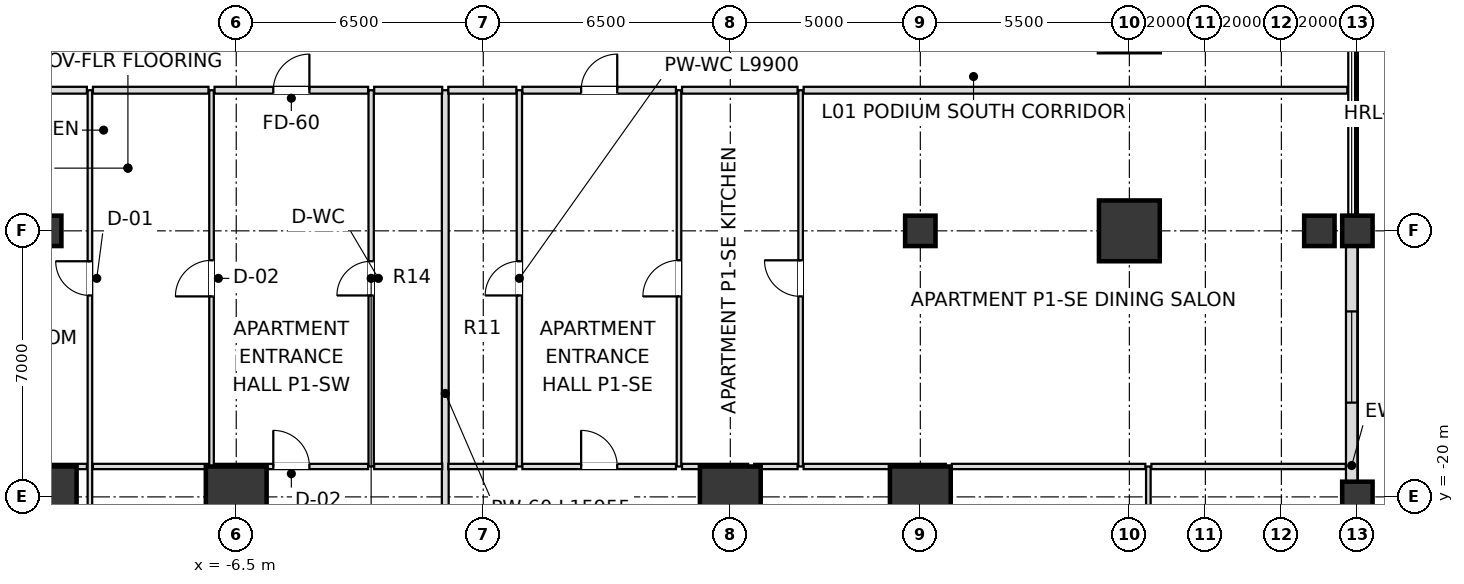
"""IFC4 building model, lengths in metres.
Left out: names, types, materials, properties, quantities, classifications, styles, units other than length and angle.
Written with IfcOpenShell. Run it as: python <this file> out.ifc"""

import sys

from ifc_helpers import new_model, si_unit, direction, frame, frame_2d, origin, origin_2d, place, context, subcontext, project, spatial, rectangle, extrude, element, fill, save


model = new_model("IFC4")
c1 = context("Model", 3, precision=1e-05, world=origin(), true_north=direction((0.0, 1.0)))
c2 = subcontext(c1, "Body", "Model", "MODEL_VIEW")
j1 = project(units=[si_unit("LENGTHUNIT", "METRE"), si_unit("PLANEANGLEUNIT", "RADIAN")], contexts=[c1])
p1 = place(None, origin())
s1 = spatial("IfcSite", under=j1, at=p1, CompositionType="ELEMENT")
p2 = place(p1, origin())
s2 = spatial("IfcBuilding", under=s1, at=p2, CompositionType="ELEMENT")
p3 = place(p2, frame((0.0, 0.0, 6.0)))
s3 = spatial("IfcBuildingStorey", under=s2, at=p3, CompositionType="ELEMENT", Elevation=6.0)
for number, where, z_axis, x_axis in (
    (1, (-11.5, -20.0, 0.0), (0.0, 0.0, 1.0), (1.0, 0.0, 0.0)),
    (2, (-6.5, -20.0, 0.0), (0.0, 0.0, 1.0), (1.0, 0.0, 0.0)),
    (3, (6.5, -20.0, 0.0), (0.0, 0.0, 1.0), (1.0, 0.0, 0.0)),
    (4, (11.5, -20.0, 0.0), (0.0, 0.0, 1.0), (1.0, 0.0, 0.0)),
    (5, (17.0, -13.0, 0.0), (0.0, 0.0, 1.0), (1.0, 0.0, 0.0)),
):
    element("IfcColumn", number, at=place(p3, frame(where, z_axis=z_axis, x_axis=x_axis)), inside=s3, PredefinedType="USERDEFINED", context=c2, shape_type="SweptSolid", body=[
        extrude(rectangle(XDim=1.6, YDim=1.6, at=origin_2d()), origin(), (0.0, 0.0, 1.0), 5.4),
    ])
for number, where, z_axis, x_axis in (
    (6, (23.0, -20.0, 0.0), (0.0, 0.0, 1.0), (1.0, 0.0, 0.0)),
    (7, (23.0, -13.0, 0.0), (0.0, 0.0, 1.0), (1.0, 0.0, 0.0)),
    (8, (-11.5, -13.0, 0.0), (0.0, 0.0, 1.0), (1.0, 0.0, 0.0)),
    (9, (11.5, -13.0, 0.0), (0.0, 0.0, 1.0), (1.0, 0.0, 0.0)),
    (10, (22.0, -13.0, 0.0), (0.0, 0.0, 1.0), (1.0, 0.0, 0.0)),
):
    element("IfcColumn", number, at=place(p3, frame(where, z_axis=z_axis, x_axis=x_axis)), inside=s3, PredefinedType="COLUMN", context=c2, shape_type="SweptSolid", body=[
        extrude(rectangle(XDim=0.8, YDim=0.8, at=origin_2d()), origin(), (0.0, 0.0, 1.0), 5.4),
    ])
p4 = place(p3, frame((22.85, -13.0, 0.0), z_axis=(0.0, 0.0, 1.0), x_axis=(0.0, -1.0, 0.0)))
e11 = element("IfcWall", 11, at=p4, inside=s3, PredefinedType="SOLIDWALL", context=c2, shape_type="SweptSolid", body=[
    extrude(rectangle(XDim=12.35, YDim=0.3, at=frame_2d((6.175, 0.0))), origin(), (0.0, 0.0, 1.0), 4.476),
])
p5 = place(p4, frame((2.12, 0.0, 0.8)))
e12 = element("IfcOpeningElement", 12, at=p5, cuts=e11, PredefinedType="OPENING", context=c2, shape_type="SweptSolid", body=[
    extrude(rectangle(XDim=2.4, YDim=2.2, at=frame_2d((1.2, 1.1))), frame((0.0, 0.16, 0.0), z_axis=(0.0, -1.0, 0.0), x_axis=(1.0, 0.0, 0.0)), (0.0, 0.0, 1.0), 0.32),
])
p6 = place(p4, frame((8.62, 0.0, 0.8)))
e13 = element("IfcOpeningElement", 13, at=p6, cuts=e11, PredefinedType="OPENING", context=c2, shape_type="SweptSolid", body=[
    extrude(rectangle(XDim=2.4, YDim=2.2, at=frame_2d((1.2, 1.1))), frame((0.0, 0.16, 0.0), z_axis=(0.0, -1.0, 0.0), x_axis=(1.0, 0.0, 0.0)), (0.0, 0.0, 1.0), 0.32),
])
p7 = place(p3, frame((-10.35, -25.195, 0.0), z_axis=(0.0, 0.0, 1.0), x_axis=(0.0, 1.0, 0.0)))
e14 = element("IfcWall", 14, at=p7, inside=s3, PredefinedType="PARTITIONING", context=c2, shape_type="SweptSolid", body=[
    extrude(rectangle(XDim=15.895, YDim=0.12, at=frame_2d((7.948, 0.0))), origin(), (0.0, 0.0, 1.0), 4.41),
])
p8 = place(p7, frame((10.495, 0.0, 0.0)))
e15 = element("IfcOpeningElement", 15, at=p8, cuts=e14, PredefinedType="OPENING", context=c2, shape_type="SweptSolid", body=[
    extrude(rectangle(XDim=0.9, YDim=2.1, at=frame_2d((0.45, 1.05))), frame((0.0, 0.07, 0.0), z_axis=(0.0, -1.0, 0.0), x_axis=(1.0, 0.0, 0.0)), (0.0, 0.0, 1.0), 0.14),
])
p9 = place(p7, frame((2.545, 0.0, 0.0)))
e16 = element("IfcOpeningElement", 16, at=p9, cuts=e14, PredefinedType="OPENING", context=c2, shape_type="SweptSolid", body=[
    extrude(rectangle(XDim=0.9, YDim=2.1, at=frame_2d((0.45, 1.05))), frame((0.0, 0.07, 0.0), z_axis=(0.0, -1.0, 0.0), x_axis=(1.0, 0.0, 0.0)), (0.0, 0.0, 1.0), 0.14),
])
p10 = place(p3, frame((-7.15, -19.2, 0.0), z_axis=(0.0, 0.0, 1.0), x_axis=(0.0, 1.0, 0.0)))
e17 = element("IfcWall", 17, at=p10, inside=s3, PredefinedType="PARTITIONING", context=c2, shape_type="SweptSolid", body=[
    extrude(rectangle(XDim=9.9, YDim=0.12, at=frame_2d((4.95, 0.0))), origin(), (0.0, 0.0, 1.0), 4.41),
])
p11 = place(p10, frame((4.475, 0.0, 0.0)))
e18 = element("IfcOpeningElement", 18, at=p11, cuts=e17, PredefinedType="OPENING", context=c2, shape_type="SweptSolid", body=[
    extrude(rectangle(XDim=0.95, YDim=2.1, at=frame_2d((0.475, 1.05))), frame((0.0, 0.07, 0.0), z_axis=(0.0, -1.0, 0.0), x_axis=(1.0, 0.0, 0.0)), (0.0, 0.0, 1.0), 0.14),
])
p12 = place(p3, frame((-2.95, -19.2, 0.0), z_axis=(0.0, 0.0, 1.0), x_axis=(0.0, 1.0, 0.0)))
e19 = element("IfcWall", 19, at=p12, inside=s3, PredefinedType="PARTITIONING", context=c2, shape_type="SweptSolid", body=[
    extrude(rectangle(XDim=9.9, YDim=0.14, at=frame_2d((4.95, 0.0))), origin(), (0.0, 0.0, 1.0), 4.642),
])
p13 = place(p12, frame((4.5, 0.0, 0.0)))
e20 = element("IfcOpeningElement", 20, at=p13, cuts=e19, PredefinedType="OPENING", context=c2, shape_type="SweptSolid", body=[
    extrude(rectangle(XDim=0.9, YDim=2.1, at=frame_2d((0.45, 1.05))), frame((0.0, 0.08, 0.0), z_axis=(0.0, -1.0, 0.0), x_axis=(1.0, 0.0, 0.0)), (0.0, 0.0, 1.0), 0.16),
])
p14 = place(p3, frame((-1.0, -25.255, 0.0), z_axis=(0.0, 0.0, 1.0), x_axis=(0.0, 1.0, 0.0)))
e21 = element("IfcWall", 21, at=p14, inside=s3, PredefinedType="PARTITIONING", context=c2, shape_type="SweptSolid", body=[
    extrude(rectangle(XDim=15.955, YDim=0.18, at=frame_2d((7.978, 0.0))), origin(), (0.0, 0.0, 1.0), 4.476),
])
p15 = place(p3, frame((0.95, -19.2, 0.0), z_axis=(0.0, 0.0, 1.0), x_axis=(0.0, 1.0, 0.0)))
e22 = element("IfcWall", 22, at=p15, inside=s3, PredefinedType="PARTITIONING", context=c2, shape_type="SweptSolid", body=[
    extrude(rectangle(XDim=9.9, YDim=0.14, at=frame_2d((4.95, 0.0))), origin(), (0.0, 0.0, 1.0), 4.642),
])
p16 = place(p15, frame((4.5, 0.0, 0.0)))
e23 = element("IfcOpeningElement", 23, at=p16, cuts=e22, PredefinedType="OPENING", context=c2, shape_type="SweptSolid", body=[
    extrude(rectangle(XDim=0.9, YDim=2.1, at=frame_2d((0.45, 1.05))), frame((0.0, 0.08, 0.0), z_axis=(0.0, -1.0, 0.0), x_axis=(1.0, 0.0, 0.0)), (0.0, 0.0, 1.0), 0.16),
])
p17 = place(p3, frame((5.15, -19.2, 0.0), z_axis=(0.0, 0.0, 1.0), x_axis=(0.0, 1.0, 0.0)))
e24 = element("IfcWall", 24, at=p17, inside=s3, PredefinedType="PARTITIONING", context=c2, shape_type="SweptSolid", body=[
    extrude(rectangle(XDim=9.9, YDim=0.12, at=frame_2d((4.95, 0.0))), origin(), (0.0, 0.0, 1.0), 4.642),
])
p18 = place(p17, frame((4.475, 0.0, 0.0)))
e25 = element("IfcOpeningElement", 25, at=p18, cuts=e24, PredefinedType="OPENING", context=c2, shape_type="SweptSolid", body=[
    extrude(rectangle(XDim=0.95, YDim=2.1, at=frame_2d((0.475, 1.05))), frame((0.0, 0.07, 0.0), z_axis=(0.0, -1.0, 0.0), x_axis=(1.0, 0.0, 0.0)), (0.0, 0.0, 1.0), 0.14),
])
p19 = place(p3, frame((7.05, -25.22, 0.0), z_axis=(0.0, 0.0, 1.0), x_axis=(0.0, 1.0, 0.0)))
e26 = element("IfcWall", 26, at=p19, inside=s3, PredefinedType="PARTITIONING", context=c2, shape_type="SweptSolid", body=[
    extrude(rectangle(XDim=6.02, YDim=0.12, at=frame_2d((3.01, 0.0))), origin(), (0.0, 0.0, 1.0), 4.476),
])
p20 = place(p19, frame((2.57, 0.0, 0.0)))
e27 = element("IfcOpeningElement", 27, at=p20, cuts=e26, PredefinedType="OPENING", context=c2, shape_type="SweptSolid", body=[
    extrude(rectangle(XDim=0.9, YDim=2.1, at=frame_2d((0.45, 1.05))), frame((0.0, 0.07, 0.0), z_axis=(0.0, -1.0, 0.0), x_axis=(1.0, 0.0, 0.0)), (0.0, 0.0, 1.0), 0.14),
])
p21 = place(p3, frame((8.35, -19.2, 0.0), z_axis=(0.0, 0.0, 1.0), x_axis=(0.0, 1.0, 0.0)))
e28 = element("IfcWall", 28, at=p21, inside=s3, PredefinedType="PARTITIONING", context=c2, shape_type="SweptSolid", body=[
    extrude(rectangle(XDim=9.9, YDim=0.12, at=frame_2d((4.95, 0.0))), origin(), (0.0, 0.0, 1.0), 4.41),
])
p22 = place(p21, frame((4.475, 0.0, 0.0)))
e29 = element("IfcOpeningElement", 29, at=p22, cuts=e28, PredefinedType="OPENING", context=c2, shape_type="SweptSolid", body=[
    extrude(rectangle(XDim=0.95, YDim=2.1, at=frame_2d((0.475, 1.05))), frame((0.0, 0.07, 0.0), z_axis=(0.0, -1.0, 0.0), x_axis=(1.0, 0.0, 0.0)), (0.0, 0.0, 1.0), 0.14),
])
p23 = place(p3, frame((12.25, -25.195, 0.0), z_axis=(0.0, 0.0, 1.0), x_axis=(0.0, 1.0, 0.0)))
e30 = element("IfcWall", 30, at=p23, inside=s3, PredefinedType="PARTITIONING", context=c2, shape_type="SweptSolid", body=[
    extrude(rectangle(XDim=5.995, YDim=0.12, at=frame_2d((2.998, 0.0))), origin(), (0.0, 0.0, 1.0), 4.476),
])
p24 = place(p23, frame((2.545, 0.0, 0.0)))
e31 = element("IfcOpeningElement", 31, at=p24, cuts=e30, PredefinedType="OPENING", context=c2, shape_type="SweptSolid", body=[
    extrude(rectangle(XDim=0.9, YDim=2.1, at=frame_2d((0.45, 1.05))), frame((0.0, 0.07, 0.0), z_axis=(0.0, -1.0, 0.0), x_axis=(1.0, 0.0, 0.0)), (0.0, 0.0, 1.0), 0.14),
])
p25 = place(p3, frame((17.5, -25.195, 0.0), z_axis=(0.0, 0.0, 1.0), x_axis=(0.0, 1.0, 0.0)))
e32 = element("IfcWall", 32, at=p25, inside=s3, PredefinedType="PARTITIONING", context=c2, shape_type="SweptSolid", body=[
    extrude(rectangle(XDim=5.995, YDim=0.12, at=frame_2d((2.998, 0.0))), origin(), (0.0, 0.0, 1.0), 4.476),
])
p26 = place(p25, frame((2.545, 0.0, 0.0)))
e33 = element("IfcOpeningElement", 33, at=p26, cuts=e32, PredefinedType="OPENING", context=c2, shape_type="SweptSolid", body=[
    extrude(rectangle(XDim=0.9, YDim=2.1, at=frame_2d((0.45, 1.05))), frame((0.0, 0.07, 0.0), z_axis=(0.0, -1.0, 0.0), x_axis=(1.0, 0.0, 0.0)), (0.0, 0.0, 1.0), 0.14),
])
p27 = place(p3, frame((-14.37, -19.2, 0.0), z_axis=(0.0, 0.0, 1.0), x_axis=(1.0, 0.0, 0.0)))
e34 = element("IfcWall", 34, at=p27, inside=s3, PredefinedType="PARTITIONING", context=c2, shape_type="SweptSolid", body=[
    extrude(rectangle(XDim=3.94, YDim=0.14, at=frame_2d((1.97, 0.0))), origin(), (0.0, 0.0, 1.0), 5.12),
])
p28 = place(p3, frame((-10.27, -19.2, 0.0), z_axis=(0.0, 0.0, 1.0), x_axis=(1.0, 0.0, 0.0)))
e35 = element("IfcWall", 35, at=p28, inside=s3, PredefinedType="PARTITIONING", context=c2, shape_type="SweptSolid", body=[
    extrude(rectangle(XDim=3.04, YDim=0.14, at=frame_2d((1.52, 0.0))), origin(), (0.0, 0.0, 1.0), 5.12),
])
p29 = place(p3, frame((-7.07, -19.2, 0.0), z_axis=(0.0, 0.0, 1.0), x_axis=(1.0, 0.0, 0.0)))
e36 = element("IfcWall", 36, at=p29, inside=s3, PredefinedType="PARTITIONING", context=c2, shape_type="SweptSolid", body=[
    extrude(rectangle(XDim=4.04, YDim=0.14, at=frame_2d((2.02, 0.0))), origin(), (0.0, 0.0, 1.0), 4.41),
])
p30 = place(p29, frame((1.545, 0.0, 0.0)))
e37 = element("IfcOpeningElement", 37, at=p30, cuts=e36, PredefinedType="OPENING", context=c2, shape_type="SweptSolid", body=[
    extrude(rectangle(XDim=0.95, YDim=2.1, at=frame_2d((0.475, 1.05))), frame((0.0, 0.08, 0.0), z_axis=(0.0, -1.0, 0.0), x_axis=(1.0, 0.0, 0.0)), (0.0, 0.0, 1.0), 0.16),
])
for number, where, z_axis, x_axis in (
    (38, (-2.87, -19.2, 0.0), (0.0, 0.0, 1.0), (1.0, 0.0, 0.0)),
    (39, (-0.92, -19.2, 0.0), (0.0, 0.0, 1.0), (1.0, 0.0, 0.0)),
):
    element("IfcWall", number, at=place(p3, frame(where, z_axis=z_axis, x_axis=x_axis)), inside=s3, PredefinedType="PARTITIONING", context=c2, shape_type="SweptSolid", body=[
        extrude(rectangle(XDim=1.79, YDim=0.14, at=frame_2d((0.895, 0.0))), origin(), (0.0, 0.0, 1.0), 5.12),
    ])
p31 = place(p3, frame((1.03, -19.2, 0.0), z_axis=(0.0, 0.0, 1.0), x_axis=(1.0, 0.0, 0.0)))
e40 = element("IfcWall", 40, at=p31, inside=s3, PredefinedType="PARTITIONING", context=c2, shape_type="SweptSolid", body=[
    extrude(rectangle(XDim=4.04, YDim=0.14, at=frame_2d((2.02, 0.0))), origin(), (0.0, 0.0, 1.0), 5.12),
])
p32 = place(p31, frame((1.545, 0.0, 0.0)))
e41 = element("IfcOpeningElement", 41, at=p32, cuts=e40, PredefinedType="OPENING", context=c2, shape_type="SweptSolid", body=[
    extrude(rectangle(XDim=0.95, YDim=2.1, at=frame_2d((0.475, 1.05))), frame((0.0, 0.08, 0.0), z_axis=(0.0, -1.0, 0.0), x_axis=(1.0, 0.0, 0.0)), (0.0, 0.0, 1.0), 0.16),
])
p33 = place(p3, frame((5.23, -19.2, 0.0), z_axis=(0.0, 0.0, 1.0), x_axis=(1.0, 0.0, 0.0)))
e42 = element("IfcWall", 42, at=p33, inside=s3, PredefinedType="PARTITIONING", context=c2, shape_type="SweptSolid", body=[
    extrude(rectangle(XDim=1.74, YDim=0.14, at=frame_2d((0.87, 0.0))), origin(), (0.0, 0.0, 1.0), 4.41),
])
p34 = place(p3, frame((7.13, -19.2, 0.0), z_axis=(0.0, 0.0, 1.0), x_axis=(1.0, 0.0, 0.0)))
e43 = element("IfcWall", 43, at=p34, inside=s3, PredefinedType="PARTITIONING", context=c2, shape_type="SweptSolid", body=[
    extrude(rectangle(XDim=1.14, YDim=0.14, at=frame_2d((0.57, 0.0))), origin(), (0.0, 0.0, 1.0), 5.12),
])
p35 = place(p3, frame((8.43, -19.2, 0.0), z_axis=(0.0, 0.0, 1.0), x_axis=(1.0, 0.0, 0.0)))
e44 = element("IfcWall", 44, at=p35, inside=s3, PredefinedType="PARTITIONING", context=c2, shape_type="SweptSolid", body=[
    extrude(rectangle(XDim=3.74, YDim=0.14, at=frame_2d((1.87, 0.0))), origin(), (0.0, 0.0, 1.0), 5.12),
])
p36 = place(p3, frame((12.33, -19.2, 0.0), z_axis=(0.0, 0.0, 1.0), x_axis=(1.0, 0.0, 0.0)))
e45 = element("IfcWall", 45, at=p36, inside=s3, PredefinedType="PARTITIONING", context=c2, shape_type="SweptSolid", body=[
    extrude(rectangle(XDim=5.09, YDim=0.14, at=frame_2d((2.545, 0.0))), origin(), (0.0, 0.0, 1.0), 5.12),
])
p37 = place(p3, frame((17.58, -19.2, 0.0), z_axis=(0.0, 0.0, 1.0), x_axis=(1.0, 0.0, 0.0)))
e46 = element("IfcWall", 46, at=p37, inside=s3, PredefinedType="PARTITIONING", context=c2, shape_type="SweptSolid", body=[
    extrude(rectangle(XDim=5.115, YDim=0.14, at=frame_2d((2.558, 0.0))), origin(), (0.0, 0.0, 1.0), 5.12),
])
p38 = place(p3, frame((-22.695, -9.3, 0.0), z_axis=(0.0, 0.0, 1.0), x_axis=(1.0, 0.0, 0.0)))
e47 = element("IfcWall", 47, at=p38, inside=s3, PredefinedType="PARTITIONING", context=c2, shape_type="SweptSolid", body=[
    extrude(rectangle(XDim=12.265, YDim=0.18, at=frame_2d((6.133, 0.0))), origin(), (0.0, 0.0, 1.0), 4.41),
])
p39 = place(p3, frame((-10.27, -9.3, 0.0), z_axis=(0.0, 0.0, 1.0), x_axis=(1.0, 0.0, 0.0)))
e48 = element("IfcWall", 48, at=p39, inside=s3, PredefinedType="PARTITIONING", context=c2, shape_type="SweptSolid", body=[
    extrude(rectangle(XDim=3.04, YDim=0.18, at=frame_2d((1.52, 0.0))), origin(), (0.0, 0.0, 1.0), 5.12),
])
p40 = place(p3, frame((-7.07, -9.3, 0.0), z_axis=(0.0, 0.0, 1.0), x_axis=(1.0, 0.0, 0.0)))
e49 = element("IfcWall", 49, at=p40, inside=s3, PredefinedType="PARTITIONING", context=c2, shape_type="SweptSolid", body=[
    extrude(rectangle(XDim=4.04, YDim=0.18, at=frame_2d((2.02, 0.0))), origin(), (0.0, 0.0, 1.0), 4.41),
])
p41 = place(p40, frame((1.545, 0.0, 0.0)))
e50 = element("IfcOpeningElement", 50, at=p41, cuts=e49, PredefinedType="OPENING", context=c2, shape_type="SweptSolid", body=[
    extrude(rectangle(XDim=0.95, YDim=2.15, at=frame_2d((0.475, 1.075))), frame((0.0, 0.1, 0.0), z_axis=(0.0, -1.0, 0.0), x_axis=(1.0, 0.0, 0.0)), (0.0, 0.0, 1.0), 0.2),
])
for number, where, z_axis, x_axis in (
    (51, (-2.87, -9.3, 0.0), (0.0, 0.0, 1.0), (1.0, 0.0, 0.0)),
    (52, (-0.92, -9.3, 0.0), (0.0, 0.0, 1.0), (1.0, 0.0, 0.0)),
):
    element("IfcWall", number, at=place(p3, frame(where, z_axis=z_axis, x_axis=x_axis)), inside=s3, PredefinedType="PARTITIONING", context=c2, shape_type="SweptSolid", body=[
        extrude(rectangle(XDim=1.79, YDim=0.18, at=frame_2d((0.895, 0.0))), origin(), (0.0, 0.0, 1.0), 5.12),
    ])
p42 = place(p3, frame((1.03, -9.3, 0.0), z_axis=(0.0, 0.0, 1.0), x_axis=(1.0, 0.0, 0.0)))
e53 = element("IfcWall", 53, at=p42, inside=s3, PredefinedType="PARTITIONING", context=c2, shape_type="SweptSolid", body=[
    extrude(rectangle(XDim=4.04, YDim=0.18, at=frame_2d((2.02, 0.0))), origin(), (0.0, 0.0, 1.0), 5.12),
])
p43 = place(p42, frame((1.545, 0.0, 0.0)))
e54 = element("IfcOpeningElement", 54, at=p43, cuts=e53, PredefinedType="OPENING", context=c2, shape_type="SweptSolid", body=[
    extrude(rectangle(XDim=0.95, YDim=2.15, at=frame_2d((0.475, 1.075))), frame((0.0, 0.1, 0.0), z_axis=(0.0, -1.0, 0.0), x_axis=(1.0, 0.0, 0.0)), (0.0, 0.0, 1.0), 0.2),
])
p44 = place(p3, frame((5.23, -9.3, 0.0), z_axis=(0.0, 0.0, 1.0), x_axis=(1.0, 0.0, 0.0)))
e55 = element("IfcWall", 55, at=p44, inside=s3, PredefinedType="PARTITIONING", context=c2, shape_type="SweptSolid", body=[
    extrude(rectangle(XDim=3.04, YDim=0.18, at=frame_2d((1.52, 0.0))), origin(), (0.0, 0.0, 1.0), 4.41),
])
p45 = place(p3, frame((8.43, -9.3, 0.0), z_axis=(0.0, 0.0, 1.0), x_axis=(1.0, 0.0, 0.0)))
e56 = element("IfcWall", 56, at=p45, inside=s3, PredefinedType="PARTITIONING", context=c2, shape_type="SweptSolid", body=[
    extrude(rectangle(XDim=14.305, YDim=0.18, at=frame_2d((7.153, 0.0))), origin(), (0.0, 0.0, 1.0), 4.41),
])
p46 = place(p5, origin())
e57 = element("IfcWindow", 57, at=p46, inside=s3, PartitioningType="SINGLE_PANEL", PredefinedType="WINDOW", context=c2, shape_type="SweptSolid", body=[
    extrude(rectangle(XDim=2.4, YDim=2.2, at=frame_2d((1.2, 1.1))), frame((0.0, 0.03, 0.0), z_axis=(0.0, -1.0, 0.0), x_axis=(1.0, 0.0, 0.0)), (0.0, 0.0, 1.0), 0.06),
])
fill(e12, e57)
p47 = place(p13, origin())
e58 = element("IfcDoor", 58, at=p47, inside=s3, OperationType="SINGLE_SWING_LEFT", PredefinedType="DOOR", context=c2, shape_type="SweptSolid", body=[
    extrude(rectangle(XDim=0.9, YDim=2.1, at=frame_2d((0.45, 1.05))), frame((0.0, 0.025, 0.0), z_axis=(0.0, -1.0, 0.0), x_axis=(1.0, 0.0, 0.0)), (0.0, 0.0, 1.0), 0.05),
])
fill(e20, e58)
p48 = place(p41, origin())
e59 = element("IfcDoor", 59, at=p48, inside=s3, OperationType="SINGLE_SWING_RIGHT", PredefinedType="DOOR", context=c2, shape_type="SweptSolid", body=[
    extrude(rectangle(XDim=0.95, YDim=2.15, at=frame_2d((0.475, 1.075))), frame((0.0, 0.025, 0.0), z_axis=(0.0, -1.0, 0.0), x_axis=(1.0, 0.0, 0.0)), (0.0, 0.0, 1.0), 0.05),
])
fill(e50, e59)
p49 = place(p11, origin())
e60 = element("IfcDoor", 60, at=p49, inside=s3, OperationType="SINGLE_SWING_LEFT", PredefinedType="DOOR", context=c2, shape_type="SweptSolid", body=[
    extrude(rectangle(XDim=0.95, YDim=2.1, at=frame_2d((0.475, 1.05))), frame((0.0, 0.025, 0.0), z_axis=(0.0, -1.0, 0.0), x_axis=(1.0, 0.0, 0.0)), (0.0, 0.0, 1.0), 0.05),
])
fill(e18, e60)
p50 = place(p8, origin())
e61 = element("IfcDoor", 61, at=p50, inside=s3, OperationType="SINGLE_SWING_RIGHT", PredefinedType="DOOR", context=c2, shape_type="SweptSolid", body=[
    extrude(rectangle(XDim=0.9, YDim=2.1, at=frame_2d((0.45, 1.05))), frame((0.0, 0.025, 0.0), z_axis=(0.0, -1.0, 0.0), x_axis=(1.0, 0.0, 0.0)), (0.0, 0.0, 1.0), 0.05),
])
fill(e15, e61)
p51 = place(p30, origin())
e62 = element("IfcDoor", 62, at=p51, inside=s3, OperationType="SINGLE_SWING_LEFT", PredefinedType="DOOR", context=c2, shape_type="SweptSolid", body=[
    extrude(rectangle(XDim=0.95, YDim=2.1, at=frame_2d((0.475, 1.05))), frame((0.0, 0.025, 0.0), z_axis=(0.0, -1.0, 0.0), x_axis=(1.0, 0.0, 0.0)), (0.0, 0.0, 1.0), 0.05),
])
fill(e37, e62)
p52 = place(p16, origin())
e63 = element("IfcDoor", 63, at=p52, inside=s3, OperationType="SINGLE_SWING_LEFT", PredefinedType="DOOR", context=c2, shape_type="SweptSolid", body=[
    extrude(rectangle(XDim=0.9, YDim=2.1, at=frame_2d((0.45, 1.05))), frame((0.0, 0.025, 0.0), z_axis=(0.0, -1.0, 0.0), x_axis=(1.0, 0.0, 0.0)), (0.0, 0.0, 1.0), 0.05),
])
fill(e23, e63)
p53 = place(p43, origin())
e64 = element("IfcDoor", 64, at=p53, inside=s3, OperationType="SINGLE_SWING_RIGHT", PredefinedType="DOOR", context=c2, shape_type="SweptSolid", body=[
    extrude(rectangle(XDim=0.95, YDim=2.15, at=frame_2d((0.475, 1.075))), frame((0.0, 0.025, 0.0), z_axis=(0.0, -1.0, 0.0), x_axis=(1.0, 0.0, 0.0)), (0.0, 0.0, 1.0), 0.05),
])
fill(e54, e64)
p54 = place(p18, origin())
e65 = element("IfcDoor", 65, at=p54, inside=s3, OperationType="SINGLE_SWING_LEFT", PredefinedType="DOOR", context=c2, shape_type="SweptSolid", body=[
    extrude(rectangle(XDim=0.95, YDim=2.1, at=frame_2d((0.475, 1.05))), frame((0.0, 0.025, 0.0), z_axis=(0.0, -1.0, 0.0), x_axis=(1.0, 0.0, 0.0)), (0.0, 0.0, 1.0), 0.05),
])
fill(e25, e65)
p55 = place(p22, origin())
e66 = element("IfcDoor", 66, at=p55, inside=s3, OperationType="SINGLE_SWING_RIGHT", PredefinedType="DOOR", context=c2, shape_type="SweptSolid", body=[
    extrude(rectangle(XDim=0.95, YDim=2.1, at=frame_2d((0.475, 1.05))), frame((0.0, 0.025, 0.0), z_axis=(0.0, -1.0, 0.0), x_axis=(1.0, 0.0, 0.0)), (0.0, 0.0, 1.0), 0.05),
])
fill(e29, e66)
p56 = place(p32, origin())
e67 = element("IfcDoor", 67, at=p56, inside=s3, OperationType="SINGLE_SWING_LEFT", PredefinedType="DOOR", context=c2, shape_type="SweptSolid", body=[
    extrude(rectangle(XDim=0.95, YDim=2.1, at=frame_2d((0.475, 1.05))), frame((0.0, 0.025, 0.0), z_axis=(0.0, -1.0, 0.0), x_axis=(1.0, 0.0, 0.0)), (0.0, 0.0, 1.0), 0.05),
])
fill(e41, e67)
save(model, sys.argv[1])
